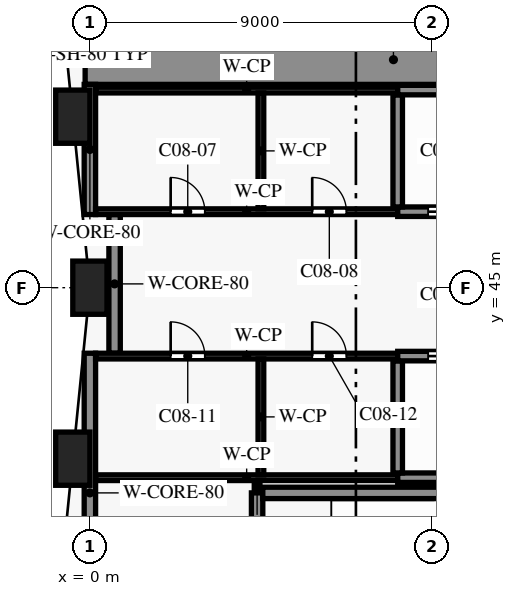
"""IFC4 building model, lengths in metres.
Left out: names, types, materials, properties, quantities, classifications, styles, units other than length and angle.
Written with IfcOpenShell. Run it as: python <this file> out.ifc"""

import sys

from ifc_helpers import new_model, si_unit, direction, frame, frame_2d, origin, origin_2d, place, context, subcontext, project, spatial, rectangle, extrude, element, fill, save


model = new_model("IFC4")
c1 = context("Model", 3, precision=1e-05, world=origin(), true_north=direction((0.0, 1.0)))
c2 = subcontext(c1, "Body", "Model", "MODEL_VIEW")
j1 = project(units=[si_unit("LENGTHUNIT", "METRE"), si_unit("PLANEANGLEUNIT", "RADIAN")], contexts=[c1])
p1 = place(None, origin())
s1 = spatial("IfcSite", under=j1, at=p1, CompositionType="ELEMENT")
p2 = place(p1, origin())
s2 = spatial("IfcBuilding", under=s1, at=p2, CompositionType="ELEMENT")
p3 = place(p2, frame((0.0, 0.0, 41.1)))
s3 = spatial("IfcBuildingStorey", under=s2, at=p3, CompositionType="ELEMENT", Elevation=41.1)
for number, where, z_axis, x_axis in (
    (1, (-0.45, 49.5, 0.0), (0.0, 0.0, 1.0), (0.1, -0.995, 0.0)),
    (2, (0.0, 45.0, 0.0), (0.0, 0.0, 1.0), (0.0, -1.0, 0.0)),
    (3, (-0.45, 40.5, 0.0), (0.0, 0.0, 1.0), (-0.1, -0.995, 0.0)),
):
    element("IfcColumn", number, at=place(p3, frame(where, z_axis=z_axis, x_axis=x_axis)), inside=s3, PredefinedType="COLUMN", context=c2, shape_type="SweptSolid", body=[
        extrude(rectangle(XDim=0.9, YDim=1.4, at=origin_2d()), origin(), (0.0, 0.0, 1.0), 3.6),
    ])
p4 = place(p3, frame((4.55, 39.6, 0.0), z_axis=(0.0, 0.0, 1.0), x_axis=(1.0, 0.0, 0.0)))
e4 = element("IfcWall", 4, at=p4, inside=s3, PredefinedType="SHEAR", context=c2, shape_type="SweptSolid", body=[
    extrude(rectangle(XDim=7.7, YDim=0.3, at=frame_2d((3.85, 0.0))), origin(), (0.0, 0.0, 1.0), 3.3),
])
p5 = place(p3, frame((0.15, 40.0, 0.0), z_axis=(0.0, 0.0, 1.0), x_axis=(1.0, 0.0, 0.0)))
e5 = element("IfcWall", 5, at=p5, inside=s3, PredefinedType="PARTITIONING", context=c2, shape_type="SweptSolid", body=[
    extrude(rectangle(XDim=7.95, YDim=0.15, at=frame_2d((3.975, 0.0))), origin(), (0.0, 0.0, 1.0), 3.3),
])
p6 = place(p3, frame((8.1, 40.0, 0.0), z_axis=(0.0, 0.0, 1.0), x_axis=(1.0, 0.0, 0.0)))
e6 = element("IfcWall", 6, at=p6, inside=s3, PredefinedType="SHEAR", context=c2, shape_type="SweptSolid", body=[
    extrude(rectangle(XDim=16.075, YDim=0.25, at=frame_2d((8.038, 0.0))), origin(), (0.0, 0.0, 1.0), 3.3),
])
p7 = place(p3, frame((0.15, 43.2, 0.0), z_axis=(0.0, 0.0, 1.0), x_axis=(1.0, 0.0, 0.0)))
e7 = element("IfcWall", 7, at=p7, inside=s3, PredefinedType="PARTITIONING", context=c2, shape_type="SweptSolid", body=[
    extrude(rectangle(XDim=7.95, YDim=0.15, at=frame_2d((3.975, 0.0))), origin(), (0.0, 0.0, 1.0), 3.3),
])
p8 = place(p7, frame((1.975, 0.0, 0.0)))
e8 = element("IfcOpeningElement", 8, at=p8, cuts=e7, PredefinedType="OPENING", context=c2, shape_type="SweptSolid", body=[
    extrude(rectangle(XDim=0.9, YDim=2.1, at=frame_2d((0.45, 1.05))), frame((0.0, 0.085, 0.0), z_axis=(0.0, -1.0, 0.0), x_axis=(1.0, 0.0, 0.0)), (0.0, 0.0, 1.0), 0.17),
])
p9 = place(p7, frame((5.7, 0.0, 0.0)))
e9 = element("IfcOpeningElement", 9, at=p9, cuts=e7, PredefinedType="OPENING", context=c2, shape_type="SweptSolid", body=[
    extrude(rectangle(XDim=0.9, YDim=2.1, at=frame_2d((0.45, 1.05))), frame((0.0, 0.085, 0.0), z_axis=(0.0, -1.0, 0.0), x_axis=(1.0, 0.0, 0.0)), (0.0, 0.0, 1.0), 0.17),
])
p10 = place(p3, frame((8.1, 43.2, 0.0), z_axis=(0.0, 0.0, 1.0), x_axis=(1.0, 0.0, 0.0)))
e10 = element("IfcWall", 10, at=p10, inside=s3, PredefinedType="SHEAR", context=c2, shape_type="SweptSolid", body=[
    extrude(rectangle(XDim=16.075, YDim=0.25, at=frame_2d((8.038, 0.0))), origin(), (0.0, 0.0, 1.0), 3.3),
])
p11 = place(p10, frame((14.3, 0.0, 0.0)))
e11 = element("IfcOpeningElement", 11, at=p11, cuts=e10, PredefinedType="OPENING", context=c2, shape_type="SweptSolid", body=[
    extrude(rectangle(XDim=1.1, YDim=2.1, at=frame_2d((0.55, 1.05))), frame((0.0, 0.135, 0.0), z_axis=(0.0, -1.0, 0.0), x_axis=(1.0, 0.0, 0.0)), (0.0, 0.0, 1.0), 0.27),
])
p12 = place(p10, frame((0.8, 0.0, 0.0)))
e12 = element("IfcOpeningElement", 12, at=p12, cuts=e10, PredefinedType="OPENING", context=c2, shape_type="SweptSolid", body=[
    extrude(rectangle(XDim=1.1, YDim=2.1, at=frame_2d((0.55, 1.05))), frame((0.0, 0.135, 0.0), z_axis=(0.0, -1.0, 0.0), x_axis=(1.0, 0.0, 0.0)), (0.0, 0.0, 1.0), 0.27),
])
p13 = place(p10, frame((3.5, 0.0, 0.0)))
e13 = element("IfcOpeningElement", 13, at=p13, cuts=e10, PredefinedType="OPENING", context=c2, shape_type="SweptSolid", body=[
    extrude(rectangle(XDim=1.1, YDim=2.1, at=frame_2d((0.55, 1.05))), frame((0.0, 0.135, 0.0), z_axis=(0.0, -1.0, 0.0), x_axis=(1.0, 0.0, 0.0)), (0.0, 0.0, 1.0), 0.27),
])
p14 = place(p10, frame((6.2, 0.0, 0.0)))
e14 = element("IfcOpeningElement", 14, at=p14, cuts=e10, PredefinedType="OPENING", context=c2, shape_type="SweptSolid", body=[
    extrude(rectangle(XDim=1.1, YDim=2.1, at=frame_2d((0.55, 1.05))), frame((0.0, 0.135, 0.0), z_axis=(0.0, -1.0, 0.0), x_axis=(1.0, 0.0, 0.0)), (0.0, 0.0, 1.0), 0.27),
])
p15 = place(p10, frame((8.9, 0.0, 0.0)))
e15 = element("IfcOpeningElement", 15, at=p15, cuts=e10, PredefinedType="OPENING", context=c2, shape_type="SweptSolid", body=[
    extrude(rectangle(XDim=1.1, YDim=2.1, at=frame_2d((0.55, 1.05))), frame((0.0, 0.135, 0.0), z_axis=(0.0, -1.0, 0.0), x_axis=(1.0, 0.0, 0.0)), (0.0, 0.0, 1.0), 0.27),
])
p16 = place(p10, frame((11.6, 0.0, 0.0)))
e16 = element("IfcOpeningElement", 16, at=p16, cuts=e10, PredefinedType="OPENING", context=c2, shape_type="SweptSolid", body=[
    extrude(rectangle(XDim=1.1, YDim=2.1, at=frame_2d((0.55, 1.05))), frame((0.0, 0.135, 0.0), z_axis=(0.0, -1.0, 0.0), x_axis=(1.0, 0.0, 0.0)), (0.0, 0.0, 1.0), 0.27),
])
p17 = place(p3, frame((0.15, 47.0, 0.0), z_axis=(0.0, 0.0, 1.0), x_axis=(1.0, 0.0, 0.0)))
e17 = element("IfcWall", 17, at=p17, inside=s3, PredefinedType="PARTITIONING", context=c2, shape_type="SweptSolid", body=[
    extrude(rectangle(XDim=7.95, YDim=0.15, at=frame_2d((3.975, 0.0))), origin(), (0.0, 0.0, 1.0), 3.3),
])
p18 = place(p17, frame((1.975, 0.0, 0.0)))
e18 = element("IfcOpeningElement", 18, at=p18, cuts=e17, PredefinedType="OPENING", context=c2, shape_type="SweptSolid", body=[
    extrude(rectangle(XDim=0.9, YDim=2.1, at=frame_2d((0.45, 1.05))), frame((0.0, 0.085, 0.0), z_axis=(0.0, -1.0, 0.0), x_axis=(1.0, 0.0, 0.0)), (0.0, 0.0, 1.0), 0.17),
])
p19 = place(p17, frame((5.7, 0.0, 0.0)))
e19 = element("IfcOpeningElement", 19, at=p19, cuts=e17, PredefinedType="OPENING", context=c2, shape_type="SweptSolid", body=[
    extrude(rectangle(XDim=0.9, YDim=2.1, at=frame_2d((0.45, 1.05))), frame((0.0, 0.085, 0.0), z_axis=(0.0, -1.0, 0.0), x_axis=(1.0, 0.0, 0.0)), (0.0, 0.0, 1.0), 0.17),
])
p20 = place(p3, frame((8.1, 47.0, 0.0), z_axis=(0.0, 0.0, 1.0), x_axis=(1.0, 0.0, 0.0)))
e20 = element("IfcWall", 20, at=p20, inside=s3, PredefinedType="SHEAR", context=c2, shape_type="SweptSolid", body=[
    extrude(rectangle(XDim=8.1, YDim=0.25, at=frame_2d((4.05, 0.0))), origin(), (0.0, 0.0, 1.0), 3.3),
])
p21 = place(p20, frame((0.8, 0.0, 0.0)))
e21 = element("IfcOpeningElement", 21, at=p21, cuts=e20, PredefinedType="OPENING", context=c2, shape_type="SweptSolid", body=[
    extrude(rectangle(XDim=1.1, YDim=2.1, at=frame_2d((0.55, 1.05))), frame((0.0, 0.135, 0.0), z_axis=(0.0, -1.0, 0.0), x_axis=(1.0, 0.0, 0.0)), (0.0, 0.0, 1.0), 0.27),
])
p22 = place(p20, frame((3.5, 0.0, 0.0)))
e22 = element("IfcOpeningElement", 22, at=p22, cuts=e20, PredefinedType="OPENING", context=c2, shape_type="SweptSolid", body=[
    extrude(rectangle(XDim=1.1, YDim=2.1, at=frame_2d((0.55, 1.05))), frame((0.0, 0.135, 0.0), z_axis=(0.0, -1.0, 0.0), x_axis=(1.0, 0.0, 0.0)), (0.0, 0.0, 1.0), 0.27),
])
p23 = place(p20, frame((6.2, 0.0, 0.0)))
e23 = element("IfcOpeningElement", 23, at=p23, cuts=e20, PredefinedType="OPENING", context=c2, shape_type="SweptSolid", body=[
    extrude(rectangle(XDim=1.1, YDim=2.1, at=frame_2d((0.55, 1.05))), frame((0.0, 0.135, 0.0), z_axis=(0.0, -1.0, 0.0), x_axis=(1.0, 0.0, 0.0)), (0.0, 0.0, 1.0), 0.27),
])
p24 = place(p3, frame((0.15, 50.2, 0.0), z_axis=(0.0, 0.0, 1.0), x_axis=(1.0, 0.0, 0.0)))
e24 = element("IfcWall", 24, at=p24, inside=s3, PredefinedType="PARTITIONING", context=c2, shape_type="SweptSolid", body=[
    extrude(rectangle(XDim=7.95, YDim=0.15, at=frame_2d((3.975, 0.0))), origin(), (0.0, 0.0, 1.0), 3.3),
])
p25 = place(p3, frame((8.1, 50.2, 0.0), z_axis=(0.0, 0.0, 1.0), x_axis=(1.0, 0.0, 0.0)))
e25 = element("IfcWall", 25, at=p25, inside=s3, PredefinedType="SHEAR", context=c2, shape_type="SweptSolid", body=[
    extrude(rectangle(XDim=7.975, YDim=0.25, at=frame_2d((3.987, 0.0))), origin(), (0.0, 0.0, 1.0), 3.3),
])
p26 = place(p3, frame((-0.125, 51.0, 0.0), z_axis=(0.0, 0.0, 1.0), x_axis=(1.0, 0.0, 0.0)))
e26 = element("IfcWall", 26, at=p26, inside=s3, PredefinedType="SHEAR", context=c2, shape_type="SweptSolid", body=[
    extrude(rectangle(XDim=16.225, YDim=1.3, at=frame_2d((8.113, 0.0))), origin(), (0.0, 0.0, 1.0), 3.3),
])
p27 = place(p3, frame((0.0, 35.925, 0.0), z_axis=(0.0, 0.0, 1.0), x_axis=(0.0, 1.0, 0.0)))
e27 = element("IfcWall", 27, at=p27, inside=s3, PredefinedType="SHEAR", context=c2, shape_type="SweptSolid", body=[
    extrude(rectangle(XDim=7.35, YDim=0.3, at=frame_2d((3.675, 0.0))), origin(), (0.0, 0.0, 1.0), 3.3),
])
p28 = place(p3, frame((0.0, 46.925, 0.0), z_axis=(0.0, 0.0, 1.0), x_axis=(0.0, 1.0, 0.0)))
e28 = element("IfcWall", 28, at=p28, inside=s3, PredefinedType="SHEAR", context=c2, shape_type="SweptSolid", body=[
    extrude(rectangle(XDim=3.425, YDim=0.3, at=frame_2d((1.712, 0.0))), origin(), (0.0, 0.0, 1.0), 3.3),
])
p29 = place(p3, frame((0.65, 43.275, 0.0), z_axis=(0.0, 0.0, 1.0), x_axis=(0.0, 1.0, 0.0)))
e29 = element("IfcWall", 29, at=p29, inside=s3, PredefinedType="SHEAR", context=c2, shape_type="SweptSolid", body=[
    extrude(rectangle(XDim=3.65, YDim=0.3, at=frame_2d((1.825, 0.0))), origin(), (0.0, 0.0, 1.0), 3.3),
])
p30 = place(p3, frame((4.4, 39.6, 0.0), z_axis=(0.0, 0.0, 1.0), x_axis=(0.0, 1.0, 0.0)))
e30 = element("IfcWall", 30, at=p30, inside=s3, PredefinedType="PARTITIONING", context=c2, shape_type="SweptSolid", body=[
    extrude(rectangle(XDim=0.325, YDim=0.15, at=frame_2d((0.163, 0.0))), origin(), (0.0, 0.0, 1.0), 3.3),
])
p31 = place(p3, frame((4.4, 36.15, 0.0), z_axis=(0.0, 0.0, 1.0), x_axis=(0.0, 1.0, 0.0)))
e31 = element("IfcWall", 31, at=p31, inside=s3, PredefinedType="SHEAR", context=c2, shape_type="SweptSolid", body=[
    extrude(rectangle(XDim=3.45, YDim=0.3, at=frame_2d((1.725, 0.0))), origin(), (0.0, 0.0, 1.0), 3.3),
])
for number, where, z_axis, x_axis in (
    (32, (4.5, 40.075, 0.0), (0.0, 0.0, 1.0), (0.0, 1.0, 0.0)),
    (33, (4.5, 47.075, 0.0), (0.0, 0.0, 1.0), (0.0, 1.0, 0.0)),
):
    element("IfcWall", number, at=place(p3, frame(where, z_axis=z_axis, x_axis=x_axis)), inside=s3, PredefinedType="PARTITIONING", context=c2, shape_type="SweptSolid", body=[
        extrude(rectangle(XDim=3.05, YDim=0.15, at=frame_2d((1.525, 0.0))), origin(), (0.0, 0.0, 1.0), 3.3),
    ])
for number, where, z_axis, x_axis in (
    (34, (8.1, 40.125, 0.0), (0.0, 0.0, 1.0), (0.0, 1.0, 0.0)),
    (35, (8.1, 47.125, 0.0), (0.0, 0.0, 1.0), (0.0, 1.0, 0.0)),
):
    element("IfcWall", number, at=place(p3, frame(where, z_axis=z_axis, x_axis=x_axis)), inside=s3, PredefinedType="SHEAR", context=c2, shape_type="SweptSolid", body=[
        extrude(rectangle(XDim=2.95, YDim=0.25, at=frame_2d((1.475, 0.0))), origin(), (0.0, 0.0, 1.0), 3.3),
    ])
p32 = place(p18, origin())
e36 = element("IfcDoor", 36, at=p32, inside=s3, OperationType="SINGLE_SWING_RIGHT", PredefinedType="DOOR", context=c2, shape_type="SweptSolid", body=[
    extrude(rectangle(XDim=0.9, YDim=2.1, at=frame_2d((0.45, 1.05))), frame((0.0, 0.025, 0.0), z_axis=(0.0, -1.0, 0.0), x_axis=(1.0, 0.0, 0.0)), (0.0, 0.0, 1.0), 0.05),
])
fill(e18, e36)
p33 = place(p19, origin())
e37 = element("IfcDoor", 37, at=p33, inside=s3, OperationType="SINGLE_SWING_LEFT", PredefinedType="DOOR", context=c2, shape_type="SweptSolid", body=[
    extrude(rectangle(XDim=0.9, YDim=2.1, at=frame_2d((0.45, 1.05))), frame((0.0, 0.025, 0.0), z_axis=(0.0, -1.0, 0.0), x_axis=(1.0, 0.0, 0.0)), (0.0, 0.0, 1.0), 0.05),
])
fill(e19, e37)
p34 = place(p8, origin())
e38 = element("IfcDoor", 38, at=p34, inside=s3, OperationType="SINGLE_SWING_LEFT", PredefinedType="DOOR", context=c2, shape_type="SweptSolid", body=[
    extrude(rectangle(XDim=0.9, YDim=2.1, at=frame_2d((0.45, 1.05))), frame((0.0, 0.025, 0.0), z_axis=(0.0, -1.0, 0.0), x_axis=(1.0, 0.0, 0.0)), (0.0, 0.0, 1.0), 0.05),
])
fill(e8, e38)
p35 = place(p9, origin())
e39 = element("IfcDoor", 39, at=p35, inside=s3, OperationType="SINGLE_SWING_RIGHT", PredefinedType="DOOR", context=c2, shape_type="SweptSolid", body=[
    extrude(rectangle(XDim=0.9, YDim=2.1, at=frame_2d((0.45, 1.05))), frame((0.0, 0.025, 0.0), z_axis=(0.0, -1.0, 0.0), x_axis=(1.0, 0.0, 0.0)), (0.0, 0.0, 1.0), 0.05),
])
fill(e9, e39)
p36 = place(p12, origin())
e40 = element("IfcDoor", 40, at=p36, inside=s3, OperationType="DOUBLE_DOOR_SLIDING", PredefinedType="DOOR", context=c2, shape_type="SweptSolid", body=[
    extrude(rectangle(XDim=1.1, YDim=2.1, at=frame_2d((0.55, 1.05))), frame((0.0, 0.025, 0.0), z_axis=(0.0, -1.0, 0.0), x_axis=(1.0, 0.0, 0.0)), (0.0, 0.0, 1.0), 0.05),
])
fill(e12, e40)
p37 = place(p21, origin())
e41 = element("IfcDoor", 41, at=p37, inside=s3, OperationType="DOUBLE_DOOR_SLIDING", PredefinedType="DOOR", context=c2, shape_type="SweptSolid", body=[
    extrude(rectangle(XDim=1.1, YDim=2.1, at=frame_2d((0.55, 1.05))), frame((0.0, 0.025, 0.0), z_axis=(0.0, -1.0, 0.0), x_axis=(1.0, 0.0, 0.0)), (0.0, 0.0, 1.0), 0.05),
])
fill(e21, e41)
save(model, sys.argv[1])
